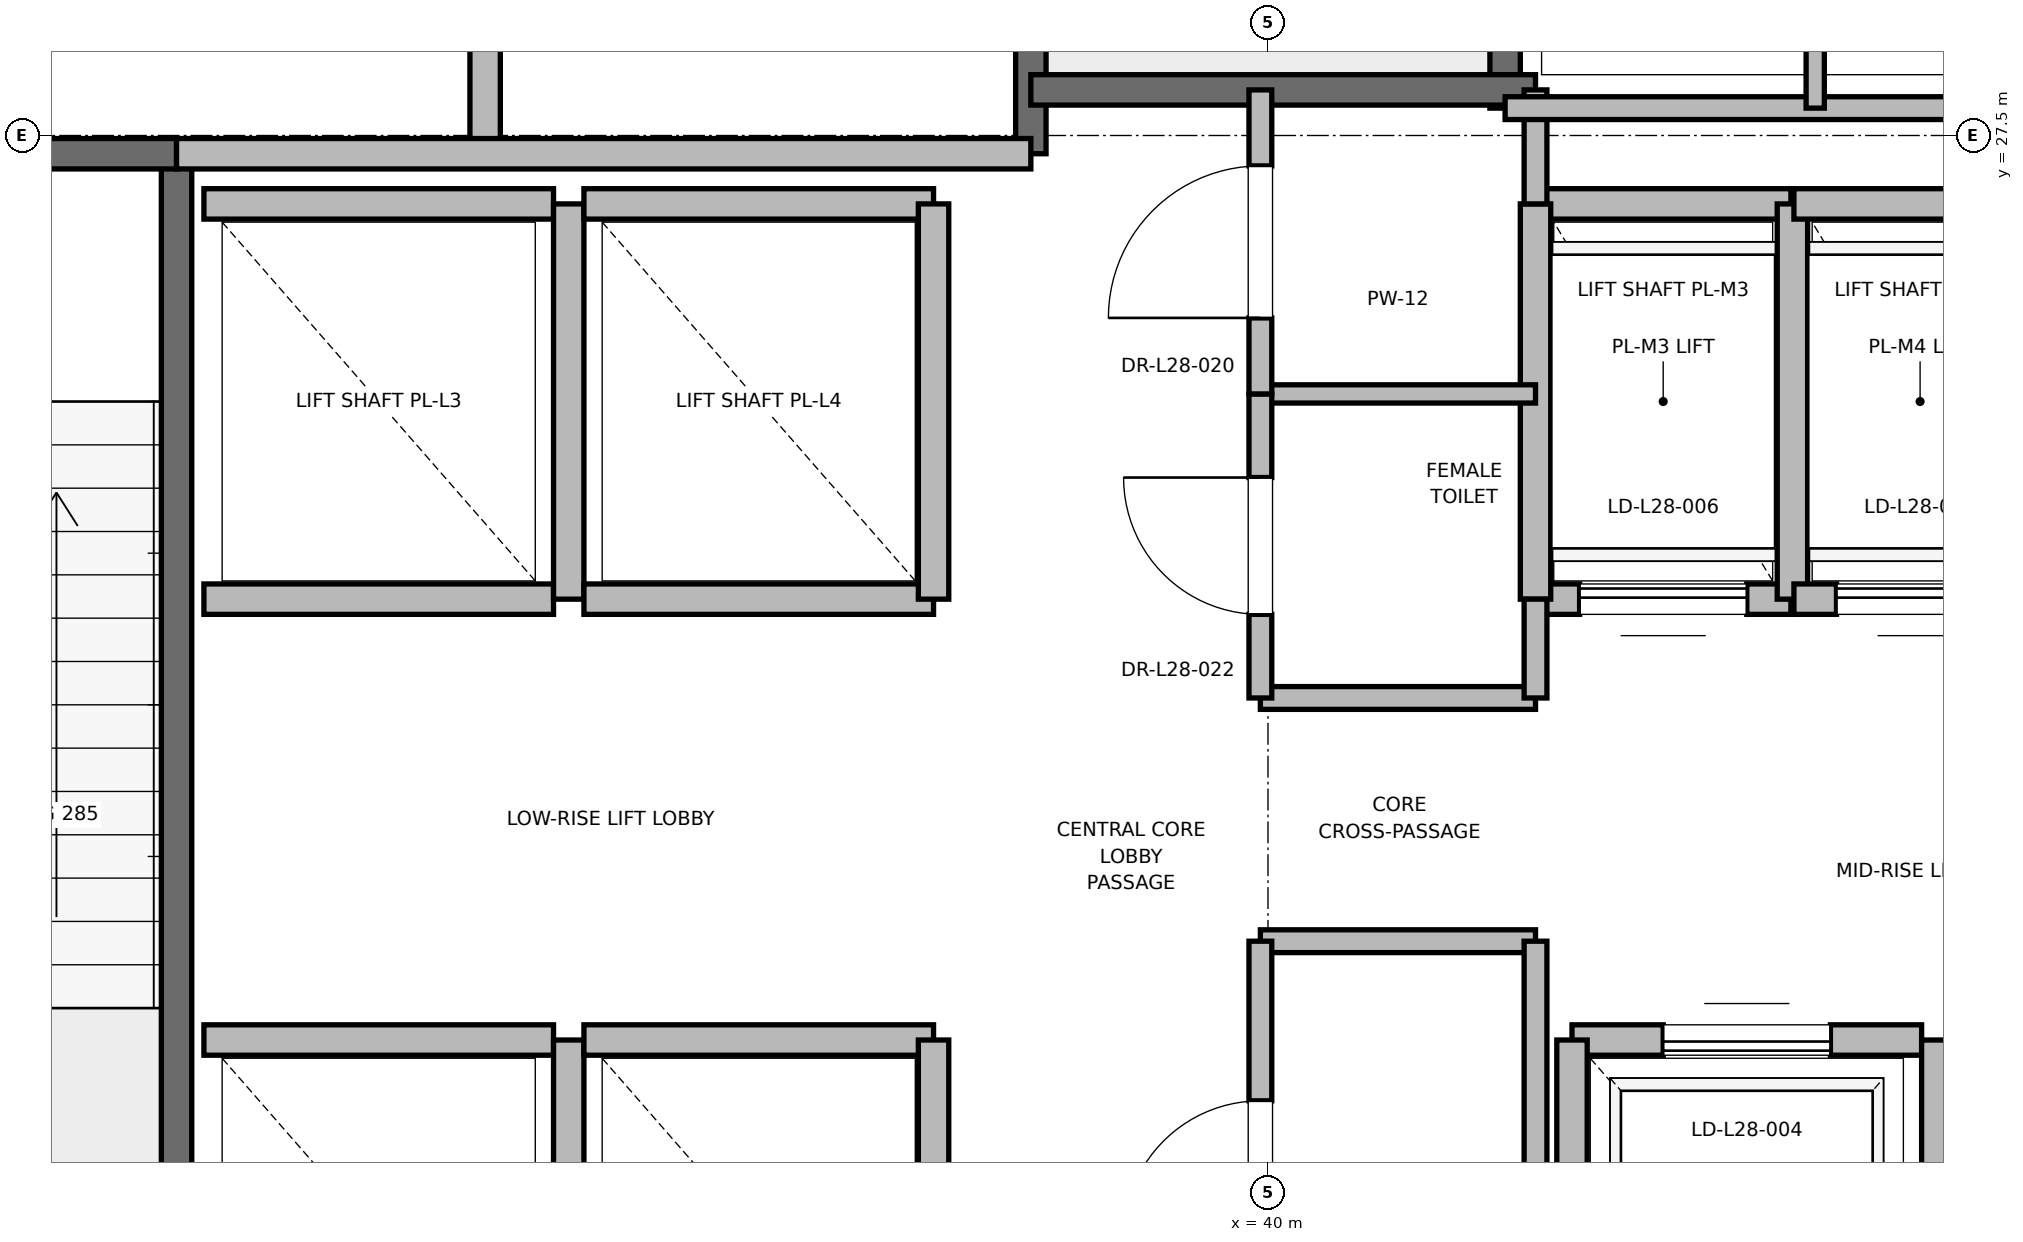
"""IFC4 building model, lengths in metres.
Left out: names, types, materials, properties, quantities, classifications, styles, units other than length and angle.
Written with IfcOpenShell. Run it as: python <this file> out.ifc"""

import sys

from ifc_helpers import new_model, si_unit, direction, frame, frame_2d, origin, place, context, subcontext, project, spatial, rectangle, extrude, element, fill, save


model = new_model("IFC4")
c1 = context("Model", 3, precision=1e-05, world=origin(), true_north=direction((0.0, 1.0)))
c2 = subcontext(c1, "Body", "Model", "MODEL_VIEW")
j1 = project(units=[si_unit("LENGTHUNIT", "METRE"), si_unit("PLANEANGLEUNIT", "RADIAN")], contexts=[c1])
p1 = place(None, origin())
s1 = spatial("IfcSite", under=j1, at=p1, CompositionType="ELEMENT")
p2 = place(p1, origin())
s2 = spatial("IfcBuilding", under=s1, at=p2, CompositionType="ELEMENT")
p3 = place(p2, frame((0.0, 0.0, 123.4)))
s3 = spatial("IfcBuildingStorey", under=s2, at=p3, CompositionType="ELEMENT", Elevation=123.4)
p4 = place(p3, frame((32.82, 18.6, 0.0), z_axis=(0.0, 0.0, 1.0), x_axis=(0.0, 1.0, 0.0)))
e1 = element("IfcWall", 1, at=p4, inside=s3, PredefinedType="SOLIDWALL", context=c2, shape_type="SweptSolid", body=[
    extrude(rectangle(XDim=8.78, YDim=0.2, at=frame_2d((4.39, 0.0))), origin(), (0.0, 0.0, 1.0), 4.775),
])
p5 = place(p3, frame((29.7, 27.38, 0.0), z_axis=(0.0, 0.0, 1.0), x_axis=(1.0, 0.0, 0.0)))
e2 = element("IfcWall", 2, at=p5, inside=s3, PredefinedType="SOLIDWALL", context=c2, shape_type="SweptSolid", body=[
    extrude(rectangle(XDim=3.12, YDim=0.2, at=frame_2d((1.56, 0.0))), origin(), (0.0, 0.0, 1.0), 4.775),
])
p6 = place(p5, frame((1.01, 0.0, 0.0)))
e3 = element("IfcOpeningElement", 3, at=p6, cuts=e2, PredefinedType="OPENING", context=c2, shape_type="SweptSolid", body=[
    extrude(rectangle(XDim=1.1, YDim=2.15, at=frame_2d((0.55, 1.075))), frame((0.0, 0.1, 0.0), z_axis=(0.0, -1.0, 0.0), x_axis=(1.0, 0.0, 0.0)), (0.0, 0.0, 1.0), 0.2),
])
p7 = place(p3, frame((38.44, 27.38, 0.0), z_axis=(0.0, 0.0, 1.0), x_axis=(0.0, 1.0, 0.0)))
e4 = element("IfcWall", 4, at=p7, inside=s3, PredefinedType="SOLIDWALL", context=c2, shape_type="SweptSolid", body=[
    extrude(rectangle(XDim=8.87, YDim=0.2, at=frame_2d((4.435, 0.0))), origin(), (0.0, 0.0, 1.0), 4.775),
])
p8 = place(p3, frame((41.56, 27.68, 0.0), z_axis=(0.0, 0.0, 1.0), x_axis=(0.0, 1.0, 0.0)))
e5 = element("IfcWall", 5, at=p8, inside=s3, PredefinedType="SOLIDWALL", context=c2, shape_type="SweptSolid", body=[
    extrude(rectangle(XDim=8.57, YDim=0.2, at=frame_2d((4.285, 0.0))), origin(), (0.0, 0.0, 1.0), 4.775),
])
p9 = place(p3, frame((38.44, 27.8, 0.0), z_axis=(0.0, 0.0, 1.0), x_axis=(1.0, 0.0, 0.0)))
e6 = element("IfcWall", 6, at=p9, inside=s3, PredefinedType="SOLIDWALL", context=c2, shape_type="SweptSolid", body=[
    extrude(rectangle(XDim=3.32, YDim=0.2, at=frame_2d((1.66, 0.0))), origin(), (0.0, 0.0, 1.0), 4.775),
])
p10 = place(p3, frame((34.85, 27.38, 0.0), z_axis=(0.0, 0.0, 1.0), x_axis=(0.0, 1.0, 0.0)))
e7 = element("IfcWall", 7, at=p10, inside=s3, PredefinedType="PARTITIONING", context=c2, shape_type="SweptSolid", body=[
    extrude(rectangle(XDim=3.37, YDim=0.2, at=frame_2d((1.685, 0.0))), origin(), (0.0, 0.0, 1.0), 4.775),
])
p11 = place(p10, frame((1.11, 0.0, 0.0)))
e8 = element("IfcOpeningElement", 8, at=p11, cuts=e7, PredefinedType="OPENING", context=c2, shape_type="SweptSolid", body=[
    extrude(rectangle(XDim=1.15, YDim=2.2, at=frame_2d((0.575, 1.1))), frame((0.0, 0.1, 0.0), z_axis=(0.0, -1.0, 0.0), x_axis=(1.0, 0.0, 0.0)), (0.0, 0.0, 1.0), 0.2),
])
p12 = place(p3, frame((32.82, 27.38, 0.0), z_axis=(0.0, 0.0, 1.0), x_axis=(1.0, 0.0, 0.0)))
e9 = element("IfcWall", 9, at=p12, inside=s3, PredefinedType="PARTITIONING", context=c2, shape_type="SweptSolid", body=[
    extrude(rectangle(XDim=5.62, YDim=0.2, at=frame_2d((2.81, 0.0))), origin(), (0.0, 0.0, 1.0), 4.775),
])
p13 = place(p3, frame((35.3, 21.55, 0.0), z_axis=(0.0, 0.0, 1.0), x_axis=(-1.0, 0.0, 0.0)))
e10 = element("IfcWall", 10, at=p13, inside=s3, PredefinedType="SOLIDWALL", context=c2, shape_type="SweptSolid", body=[
    extrude(rectangle(XDim=2.3, YDim=0.2, at=frame_2d((1.15, 0.0))), origin(), (0.0, 0.0, 1.0), 4.775),
])
p14 = place(p3, frame((35.4, 18.95, 0.0), z_axis=(0.0, 0.0, 1.0), x_axis=(0.0, 1.0, 0.0)))
e11 = element("IfcWall", 11, at=p14, inside=s3, PredefinedType="SOLIDWALL", context=c2, shape_type="SweptSolid", body=[
    extrude(rectangle(XDim=2.6, YDim=0.2, at=frame_2d((1.3, 0.0))), origin(), (0.0, 0.0, 1.0), 4.775),
])
p15 = place(p3, frame((37.8, 21.55, 0.0), z_axis=(0.0, 0.0, 1.0), x_axis=(-1.0, 0.0, 0.0)))
e12 = element("IfcWall", 12, at=p15, inside=s3, PredefinedType="SOLIDWALL", context=c2, shape_type="SweptSolid", body=[
    extrude(rectangle(XDim=2.3, YDim=0.2, at=frame_2d((1.15, 0.0))), origin(), (0.0, 0.0, 1.0), 4.775),
])
p16 = place(p3, frame((37.8, 18.95, 0.0), z_axis=(0.0, 0.0, 1.0), x_axis=(0.0, 1.0, 0.0)))
e13 = element("IfcWall", 13, at=p16, inside=s3, PredefinedType="SOLIDWALL", context=c2, shape_type="SweptSolid", body=[
    extrude(rectangle(XDim=2.6, YDim=0.2, at=frame_2d((1.3, 0.0))), origin(), (0.0, 0.0, 1.0), 3.755),
])
for number, where, z_axis, x_axis in (
    (14, (33.0, 24.45, 0.0), (0.0, 0.0, 1.0), (1.0, 0.0, 0.0)),
    (15, (35.3, 27.05, 0.0), (0.0, 0.0, 1.0), (-1.0, 0.0, 0.0)),
):
    element("IfcWall", number, at=place(p3, frame(where, z_axis=z_axis, x_axis=x_axis)), inside=s3, PredefinedType="SOLIDWALL", context=c2, shape_type="SweptSolid", body=[
        extrude(rectangle(XDim=2.3, YDim=0.2, at=frame_2d((1.15, 0.0))), origin(), (0.0, 0.0, 1.0), 4.775),
    ])
p17 = place(p3, frame((35.4, 24.45, 0.0), z_axis=(0.0, 0.0, 1.0), x_axis=(0.0, 1.0, 0.0)))
e16 = element("IfcWall", 16, at=p17, inside=s3, PredefinedType="SOLIDWALL", context=c2, shape_type="SweptSolid", body=[
    extrude(rectangle(XDim=2.6, YDim=0.2, at=frame_2d((1.3, 0.0))), origin(), (0.0, 0.0, 1.0), 4.775),
])
for number, where, z_axis, x_axis in (
    (17, (35.5, 24.45, 0.0), (0.0, 0.0, 1.0), (1.0, 0.0, 0.0)),
    (18, (37.8, 27.05, 0.0), (0.0, 0.0, 1.0), (-1.0, 0.0, 0.0)),
):
    element("IfcWall", number, at=place(p3, frame(where, z_axis=z_axis, x_axis=x_axis)), inside=s3, PredefinedType="SOLIDWALL", context=c2, shape_type="SweptSolid", body=[
        extrude(rectangle(XDim=2.3, YDim=0.2, at=frame_2d((1.15, 0.0))), origin(), (0.0, 0.0, 1.0), 4.775),
    ])
p18 = place(p3, frame((37.8, 24.45, 0.0), z_axis=(0.0, 0.0, 1.0), x_axis=(0.0, 1.0, 0.0)))
e19 = element("IfcWall", 19, at=p18, inside=s3, PredefinedType="SOLIDWALL", context=c2, shape_type="SweptSolid", body=[
    extrude(rectangle(XDim=2.6, YDim=0.2, at=frame_2d((1.3, 0.0))), origin(), (0.0, 0.0, 1.0), 4.775),
])
p19 = place(p3, frame((44.3, 21.55, 0.0), z_axis=(0.0, 0.0, 1.0), x_axis=(-1.0, 0.0, 0.0)))
e20 = element("IfcWall", 20, at=p19, inside=s3, PredefinedType="SOLIDWALL", context=c2, shape_type="SweptSolid", body=[
    extrude(rectangle(XDim=2.3, YDim=0.2, at=frame_2d((1.15, 0.0))), origin(), (0.0, 0.0, 1.0), 4.775),
])
p20 = place(p19, frame((0.6, 0.0, 0.0)))
e21 = element("IfcOpeningElement", 21, at=p20, cuts=e20, PredefinedType="OPENING", context=c2, shape_type="SweptSolid", body=[
    extrude(rectangle(XDim=1.1, YDim=2.2, at=frame_2d((0.55, 1.1))), frame((0.0, 0.1, 0.0), z_axis=(0.0, -1.0, 0.0), x_axis=(1.0, 0.0, 0.0)), (0.0, 0.0, 1.0), 0.2),
])
p21 = place(p3, frame((42.0, 21.55, 0.0), z_axis=(0.0, 0.0, 1.0), x_axis=(0.0, -1.0, 0.0)))
e22 = element("IfcWall", 22, at=p21, inside=s3, PredefinedType="SOLIDWALL", context=c2, shape_type="SweptSolid", body=[
    extrude(rectangle(XDim=2.6, YDim=0.2, at=frame_2d((1.3, 0.0))), origin(), (0.0, 0.0, 1.0), 3.755),
])
p22 = place(p3, frame((44.4, 18.95, 0.0), z_axis=(0.0, 0.0, 1.0), x_axis=(0.0, 1.0, 0.0)))
e23 = element("IfcWall", 23, at=p22, inside=s3, PredefinedType="SOLIDWALL", context=c2, shape_type="SweptSolid", body=[
    extrude(rectangle(XDim=2.6, YDim=0.2, at=frame_2d((1.3, 0.0))), origin(), (0.0, 0.0, 1.0), 4.775),
])
p23 = place(p3, frame((41.76, 24.45, 0.0), z_axis=(0.0, 0.0, 1.0), x_axis=(1.0, 0.0, 0.0)))
e24 = element("IfcWall", 24, at=p23, inside=s3, PredefinedType="SOLIDWALL", context=c2, shape_type="SweptSolid", body=[
    extrude(rectangle(XDim=1.68, YDim=0.2, at=frame_2d((0.84, 0.0))), origin(), (0.0, 0.0, 1.0), 4.775),
])
p24 = place(p23, frame((0.29, 0.0, 0.0)))
e25 = element("IfcOpeningElement", 25, at=p24, cuts=e24, PredefinedType="OPENING", context=c2, shape_type="SweptSolid", body=[
    extrude(rectangle(XDim=1.1, YDim=2.2, at=frame_2d((0.55, 1.1))), frame((0.0, 0.1, 0.0), z_axis=(0.0, -1.0, 0.0), x_axis=(1.0, 0.0, 0.0)), (0.0, 0.0, 1.0), 0.2),
])
p25 = place(p3, frame((43.44, 27.05, 0.0), z_axis=(0.0, 0.0, 1.0), x_axis=(-1.0, 0.0, 0.0)))
e26 = element("IfcWall", 26, at=p25, inside=s3, PredefinedType="SOLIDWALL", context=c2, shape_type="SweptSolid", body=[
    extrude(rectangle(XDim=1.68, YDim=0.2, at=frame_2d((0.84, 0.0))), origin(), (0.0, 0.0, 1.0), 4.775),
])
for number, where, z_axis, x_axis in (
    (27, (41.76, 27.05, 0.0), (0.0, 0.0, 1.0), (0.0, -1.0, 0.0)),
    (28, (43.45, 24.45, 0.0), (0.0, 0.0, 1.0), (0.0, 1.0, 0.0)),
):
    element("IfcWall", number, at=place(p3, frame(where, z_axis=z_axis, x_axis=x_axis)), inside=s3, PredefinedType="SOLIDWALL", context=c2, shape_type="SweptSolid", body=[
        extrude(rectangle(XDim=2.6, YDim=0.2, at=frame_2d((1.3, 0.0))), origin(), (0.0, 0.0, 1.0), 4.775),
    ])
p26 = place(p3, frame((43.46, 24.45, 0.0), z_axis=(0.0, 0.0, 1.0), x_axis=(1.0, 0.0, 0.0)))
e29 = element("IfcWall", 29, at=p26, inside=s3, PredefinedType="SOLIDWALL", context=c2, shape_type="SweptSolid", body=[
    extrude(rectangle(XDim=1.66, YDim=0.2, at=frame_2d((0.83, 0.0))), origin(), (0.0, 0.0, 1.0), 4.775),
])
p27 = place(p26, frame((0.28, 0.0, 0.0)))
e30 = element("IfcOpeningElement", 30, at=p27, cuts=e29, PredefinedType="OPENING", context=c2, shape_type="SweptSolid", body=[
    extrude(rectangle(XDim=1.1, YDim=2.2, at=frame_2d((0.55, 1.1))), frame((0.0, 0.1, 0.0), z_axis=(0.0, -1.0, 0.0), x_axis=(1.0, 0.0, 0.0)), (0.0, 0.0, 1.0), 0.2),
])
p28 = place(p3, frame((45.12, 27.05, 0.0), z_axis=(0.0, 0.0, 1.0), x_axis=(-1.0, 0.0, 0.0)))
e31 = element("IfcWall", 31, at=p28, inside=s3, PredefinedType="SOLIDWALL", context=c2, shape_type="SweptSolid", body=[
    extrude(rectangle(XDim=1.66, YDim=0.2, at=frame_2d((0.83, 0.0))), origin(), (0.0, 0.0, 1.0), 4.775),
])
for number, where, z_axis, x_axis in (
    (32, (39.95, 22.2, 0.0), (0.0, 0.0, 1.0), (1.0, 0.0, 0.0)),
    (33, (39.95, 23.8, 0.0), (0.0, 0.0, 1.0), (1.0, 0.0, 0.0)),
):
    element("IfcWall", number, at=place(p3, frame(where, z_axis=z_axis, x_axis=x_axis)), inside=s3, PredefinedType="PARTITIONING", context=c2, shape_type="SweptSolid", body=[
        extrude(rectangle(XDim=1.81, YDim=0.15, at=frame_2d((0.905, 0.0))), origin(), (0.0, 0.0, 1.0), 2.85),
    ])
p29 = place(p3, frame((39.95, 25.8, 0.0), z_axis=(0.0, 0.0, 1.0), x_axis=(1.0, 0.0, 0.0)))
e34 = element("IfcWall", 34, at=p29, inside=s3, PredefinedType="PARTITIONING", context=c2, shape_type="SweptSolid", body=[
    extrude(rectangle(XDim=1.81, YDim=0.12, at=frame_2d((0.905, 0.0))), origin(), (0.0, 0.0, 1.0), 2.85),
])
p30 = place(p3, frame((41.76, 18.6, 0.0), z_axis=(0.0, 0.0, 1.0), x_axis=(0.0, 1.0, 0.0)))
e35 = element("IfcWall", 35, at=p30, inside=s3, PredefinedType="PARTITIONING", context=c2, shape_type="SweptSolid", body=[
    extrude(rectangle(XDim=3.6, YDim=0.15, at=frame_2d((1.8, 0.0))), origin(), (0.0, 0.0, 1.0), 2.85),
])
p31 = place(p3, frame((41.76, 23.8, 0.0), z_axis=(0.0, 0.0, 1.0), x_axis=(0.0, 1.0, 0.0)))
e36 = element("IfcWall", 36, at=p31, inside=s3, PredefinedType="PARTITIONING", context=c2, shape_type="SweptSolid", body=[
    extrude(rectangle(XDim=0.65, YDim=0.15, at=frame_2d((0.325, 0.0))), origin(), (0.0, 0.0, 1.0), 2.85),
])
p32 = place(p3, frame((41.76, 27.05, 0.0), z_axis=(0.0, 0.0, 1.0), x_axis=(0.0, 1.0, 0.0)))
e37 = element("IfcWall", 37, at=p32, inside=s3, PredefinedType="PARTITIONING", context=c2, shape_type="SweptSolid", body=[
    extrude(rectangle(XDim=0.75, YDim=0.15, at=frame_2d((0.375, 0.0))), origin(), (0.0, 0.0, 1.0), 2.85),
])
p33 = place(p3, frame((39.95, 19.2, 0.0), z_axis=(0.0, 0.0, 1.0), x_axis=(0.0, 1.0, 0.0)))
e38 = element("IfcWall", 38, at=p33, inside=s3, PredefinedType="PARTITIONING", context=c2, shape_type="SweptSolid", body=[
    extrude(rectangle(XDim=3.0, YDim=0.15, at=frame_2d((1.5, 0.0))), origin(), (0.0, 0.0, 1.0), 2.85),
])
p34 = place(p33, frame((1.05, 0.0, 0.0)))
e39 = element("IfcOpeningElement", 39, at=p34, cuts=e38, PredefinedType="OPENING", context=c2, shape_type="SweptSolid", body=[
    extrude(rectangle(XDim=0.9, YDim=2.1, at=frame_2d((0.45, 1.05))), frame((0.0, 0.075, 0.0), z_axis=(0.0, -1.0, 0.0), x_axis=(1.0, 0.0, 0.0)), (0.0, 0.0, 1.0), 0.15),
])
p35 = place(p3, frame((39.95, 23.8, 0.0), z_axis=(0.0, 0.0, 1.0), x_axis=(0.0, 1.0, 0.0)))
e40 = element("IfcWall", 40, at=p35, inside=s3, PredefinedType="PARTITIONING", context=c2, shape_type="SweptSolid", body=[
    extrude(rectangle(XDim=2.0, YDim=0.15, at=frame_2d((1.0, 0.0))), origin(), (0.0, 0.0, 1.0), 2.85),
])
p36 = place(p35, frame((0.55, 0.0, 0.0)))
e41 = element("IfcOpeningElement", 41, at=p36, cuts=e40, PredefinedType="OPENING", context=c2, shape_type="SweptSolid", body=[
    extrude(rectangle(XDim=0.9, YDim=2.1, at=frame_2d((0.45, 1.05))), frame((0.0, 0.075, 0.0), z_axis=(0.0, -1.0, 0.0), x_axis=(1.0, 0.0, 0.0)), (0.0, 0.0, 1.0), 0.15),
])
p37 = place(p3, frame((39.95, 25.8, 0.0), z_axis=(0.0, 0.0, 1.0), x_axis=(0.0, 1.0, 0.0)))
e42 = element("IfcWall", 42, at=p37, inside=s3, PredefinedType="PARTITIONING", context=c2, shape_type="SweptSolid", body=[
    extrude(rectangle(XDim=2.0, YDim=0.15, at=frame_2d((1.0, 0.0))), origin(), (0.0, 0.0, 1.0), 2.85),
])
p38 = place(p37, frame((0.5, 0.0, 0.0)))
e43 = element("IfcOpeningElement", 43, at=p38, cuts=e42, PredefinedType="OPENING", context=c2, shape_type="SweptSolid", body=[
    extrude(rectangle(XDim=1.0, YDim=2.15, at=frame_2d((0.5, 1.075))), frame((0.0, 0.075, 0.0), z_axis=(0.0, -1.0, 0.0), x_axis=(1.0, 0.0, 0.0)), (0.0, 0.0, 1.0), 0.15),
])
p39 = place(p3, frame((41.56, 27.68, 0.0), z_axis=(0.0, 0.0, 1.0), x_axis=(1.0, 0.0, 0.0)))
e44 = element("IfcWall", 44, at=p39, inside=s3, PredefinedType="PARTITIONING", context=c2, shape_type="SweptSolid", body=[
    extrude(rectangle(XDim=3.59, YDim=0.15, at=frame_2d((1.795, 0.0))), origin(), (0.0, 0.0, 1.0), 2.85),
])
p40 = place(p3, frame((43.6, 27.68, 0.0), z_axis=(0.0, 0.0, 1.0), x_axis=(0.0, 1.0, 0.0)))
e45 = element("IfcWall", 45, at=p40, inside=s3, PredefinedType="PARTITIONING", context=c2, shape_type="SweptSolid", body=[
    extrude(rectangle(XDim=3.04, YDim=0.12, at=frame_2d((1.52, 0.0))), origin(), (0.0, 0.0, 1.0), 2.85),
])
p41 = place(p20, origin())
e46 = element("IfcDoor", 46, at=p41, inside=s3, OperationType="SLIDING_TO_RIGHT", PredefinedType="DOOR", context=c2, shape_type="SweptSolid", body=[
    extrude(rectangle(XDim=1.1, YDim=2.2, at=frame_2d((0.55, 1.1))), frame((0.0, 0.025, 0.0), z_axis=(0.0, -1.0, 0.0), x_axis=(1.0, 0.0, 0.0)), (0.0, 0.0, 1.0), 0.05),
])
fill(e21, e46)
p42 = place(p24, origin())
e47 = element("IfcDoor", 47, at=p42, inside=s3, OperationType="SLIDING_TO_RIGHT", PredefinedType="DOOR", context=c2, shape_type="SweptSolid", body=[
    extrude(rectangle(XDim=1.1, YDim=2.2, at=frame_2d((0.55, 1.1))), frame((0.0, 0.025, 0.0), z_axis=(0.0, -1.0, 0.0), x_axis=(1.0, 0.0, 0.0)), (0.0, 0.0, 1.0), 0.05),
])
fill(e25, e47)
p43 = place(p27, origin())
e48 = element("IfcDoor", 48, at=p43, inside=s3, OperationType="SLIDING_TO_RIGHT", PredefinedType="DOOR", context=c2, shape_type="SweptSolid", body=[
    extrude(rectangle(XDim=1.1, YDim=2.2, at=frame_2d((0.55, 1.1))), frame((0.0, 0.025, 0.0), z_axis=(0.0, -1.0, 0.0), x_axis=(1.0, 0.0, 0.0)), (0.0, 0.0, 1.0), 0.05),
])
fill(e30, e48)
p44 = place(p34, origin())
e49 = element("IfcDoor", 49, at=p44, inside=s3, OperationType="SINGLE_SWING_LEFT", PredefinedType="DOOR", context=c2, shape_type="SweptSolid", body=[
    extrude(rectangle(XDim=0.9, YDim=2.1, at=frame_2d((0.45, 1.05))), frame((0.0, 0.025, 0.0), z_axis=(0.0, -1.0, 0.0), x_axis=(1.0, 0.0, 0.0)), (0.0, 0.0, 1.0), 0.05),
])
fill(e39, e49)
p45 = place(p36, origin())
e50 = element("IfcDoor", 50, at=p45, inside=s3, OperationType="SINGLE_SWING_RIGHT", PredefinedType="DOOR", context=c2, shape_type="SweptSolid", body=[
    extrude(rectangle(XDim=0.9, YDim=2.1, at=frame_2d((0.45, 1.05))), frame((0.0, 0.025, 0.0), z_axis=(0.0, -1.0, 0.0), x_axis=(1.0, 0.0, 0.0)), (0.0, 0.0, 1.0), 0.05),
])
fill(e41, e50)
p46 = place(p38, origin())
e51 = element("IfcDoor", 51, at=p46, inside=s3, OperationType="SINGLE_SWING_LEFT", PredefinedType="DOOR", context=c2, shape_type="SweptSolid", body=[
    extrude(rectangle(XDim=1.0, YDim=2.15, at=frame_2d((0.5, 1.075))), frame((0.0, 0.025, 0.0), z_axis=(0.0, -1.0, 0.0), x_axis=(1.0, 0.0, 0.0)), (0.0, 0.0, 1.0), 0.05),
])
fill(e43, e51)
save(model, sys.argv[1])
